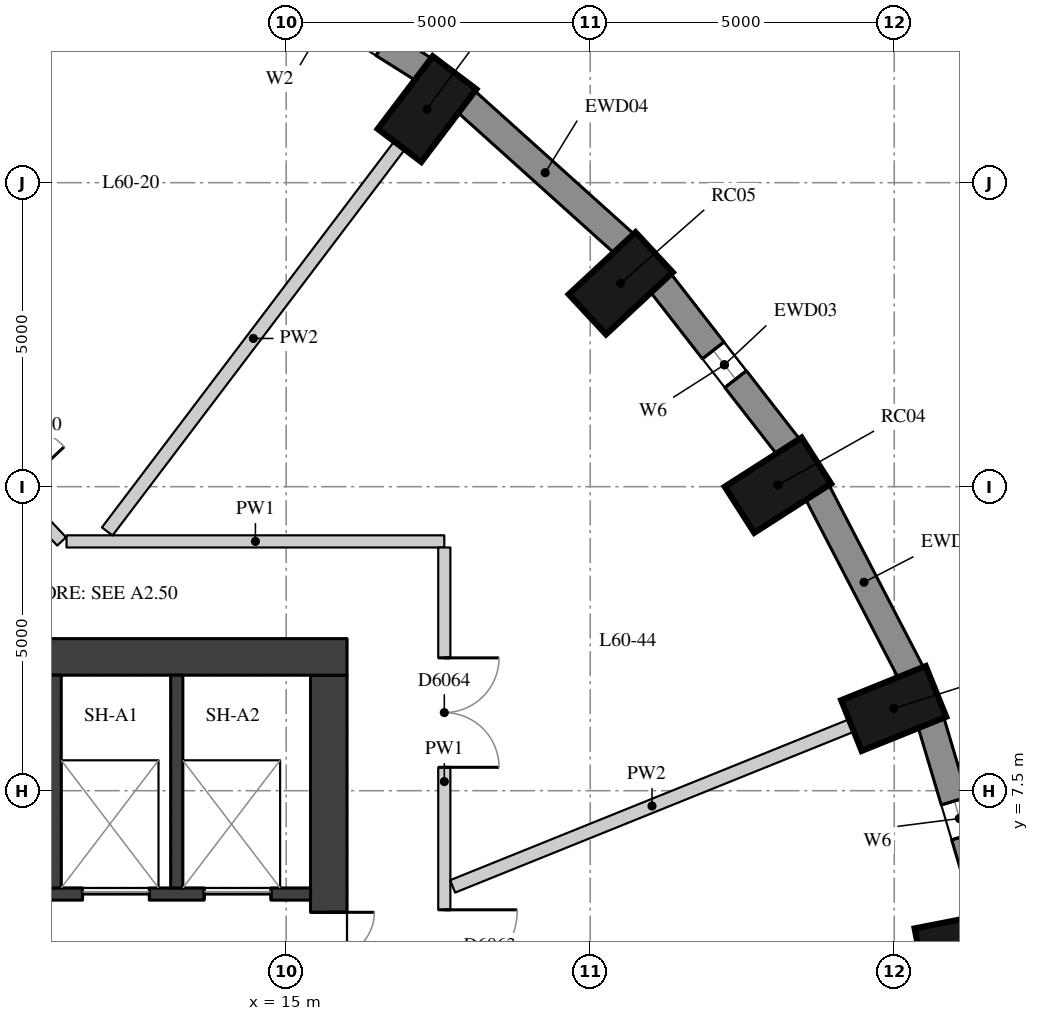
"""IFC4 building model, lengths in metres.
Left out: names, types, materials, properties, quantities, classifications, styles, units other than length and angle.
Written with IfcOpenShell. Run it as: python <this file> out.ifc"""

import sys

from ifc_helpers import new_model, si_unit, direction, frame, frame_2d, origin, origin_2d, place, context, subcontext, project, spatial, rectangle, extrude, element, fill, save


model = new_model("IFC4")
c1 = context("Model", 3, precision=1e-05, world=origin(), true_north=direction((0.0, 1.0)))
c2 = subcontext(c1, "Body", "Model", "MODEL_VIEW")
j1 = project(units=[si_unit("LENGTHUNIT", "METRE"), si_unit("PLANEANGLEUNIT", "RADIAN")], contexts=[c1])
p1 = place(None, origin())
s1 = spatial("IfcSite", under=j1, at=p1, CompositionType="ELEMENT")
p2 = place(p1, origin())
s2 = spatial("IfcBuilding", under=s1, at=p2, CompositionType="ELEMENT")
p3 = place(p2, frame((0.0, 0.0, 212.3)))
s3 = spatial("IfcBuildingStorey", under=s2, at=p3, CompositionType="ELEMENT", Elevation=212.3)
for number, where, z_axis, x_axis in (
    (1, (26.157, 4.937, 0.0), (0.0, 0.0, 1.0), (0.981, 0.192, 0.0)),
    (2, (24.991, 8.852, 0.0), (0.0, 0.0, 1.0), (0.927, 0.374, 0.0)),
    (3, (23.087, 12.525, 0.0), (0.0, 0.0, 1.0), (0.842, 0.539, 0.0)),
    (4, (20.502, 15.845, 0.0), (0.0, 0.0, 1.0), (0.732, 0.681, 0.0)),
    (5, (17.316, 18.71, 0.0), (0.0, 0.0, 1.0), (0.604, 0.797, 0.0)),
):
    element("IfcColumn", number, at=place(p3, frame(where, z_axis=z_axis, x_axis=x_axis)), inside=s3, PredefinedType="COLUMN", context=c2, shape_type="SweptSolid", body=[
        extrude(rectangle(XDim=1.5, YDim=0.9, at=origin_2d()), origin(), (0.0, 0.0, 1.0), 3.3),
    ])
p4 = place(p3, frame((26.548, 5.452, 0.0), z_axis=(0.0, 0.0, 1.0), x_axis=(-0.285444972963, 0.958395099847, 0.0)))
e6 = element("IfcWall", 6, at=p4, inside=s3, PredefinedType="SOLIDWALL", context=c2, shape_type="SweptSolid", body=[
    extrude(rectangle(XDim=3.32, YDim=0.45, at=frame_2d((1.66, 0.0))), origin(), (0.0, 0.0, 1.0), 3.02),
])
p5 = place(p4, frame((1.36, 0.0, 0.4)))
e7 = element("IfcOpeningElement", 7, at=p5, cuts=e6, PredefinedType="OPENING", context=c2, shape_type="SweptSolid", body=[
    extrude(rectangle(XDim=0.6, YDim=1.75, at=frame_2d((0.3, 0.875))), frame((0.0, 0.235, 0.0), z_axis=(0.0, -1.0, 0.0), x_axis=(1.0, 0.0, 0.0)), (0.0, 0.0, 1.0), 0.47),
])
p6 = place(p3, frame((25.278, 9.432, 0.0), z_axis=(0.0, 0.0, 1.0), x_axis=(-0.460175500475, 0.887827972505, 0.0)))
e8 = element("IfcWall", 8, at=p6, inside=s3, PredefinedType="SOLIDWALL", context=c2, shape_type="SweptSolid", body=[
    extrude(rectangle(XDim=3.371, YDim=0.45, at=frame_2d((1.685, 0.0))), origin(), (0.0, 0.0, 1.0), 3.02),
])
p7 = place(p3, frame((23.263, 13.148, 0.0), z_axis=(0.0, 0.0, 1.0), x_axis=(-0.614220816451, 0.789134201919, 0.0)))
e9 = element("IfcWall", 9, at=p7, inside=s3, PredefinedType="SOLIDWALL", context=c2, shape_type="SweptSolid", body=[
    extrude(rectangle(XDim=3.438, YDim=0.45, at=frame_2d((1.719, 0.0))), origin(), (0.0, 0.0, 1.0), 3.02),
])
p8 = place(p7, frame((1.419, 0.0, 0.4)))
e10 = element("IfcOpeningElement", 10, at=p8, cuts=e9, PredefinedType="OPENING", context=c2, shape_type="SweptSolid", body=[
    extrude(rectangle(XDim=0.6, YDim=1.75, at=frame_2d((0.3, 0.875))), frame((0.0, 0.235, 0.0), z_axis=(0.0, -1.0, 0.0), x_axis=(1.0, 0.0, 0.0)), (0.0, 0.0, 1.0), 0.47),
])
p9 = place(p3, frame((20.565, 16.49, 0.0), z_axis=(0.0, 0.0, 1.0), x_axis=(-0.743442727602, 0.668799604348, 0.0)))
e11 = element("IfcWall", 11, at=p9, inside=s3, PredefinedType="SOLIDWALL", context=c2, shape_type="SweptSolid", body=[
    extrude(rectangle(XDim=3.513, YDim=0.45, at=frame_2d((1.756, 0.0))), origin(), (0.0, 0.0, 1.0), 3.02),
])
p10 = place(p3, frame((17.267, 19.358, 0.0), z_axis=(0.0, 0.0, 1.0), x_axis=(-0.846119146727, 0.532993798783, 0.0)))
e12 = element("IfcWall", 12, at=p10, inside=s3, PredefinedType="SOLIDWALL", context=c2, shape_type="SweptSolid", body=[
    extrude(rectangle(XDim=3.587, YDim=0.45, at=frame_2d((1.793, 0.0))), origin(), (0.0, 0.0, 1.0), 3.02),
])
p11 = place(p10, frame((0.793, 0.0, 0.4)))
e13 = element("IfcOpeningElement", 13, at=p11, cuts=e12, PredefinedType="OPENING", context=c2, shape_type="SweptSolid", body=[
    extrude(rectangle(XDim=2.0, YDim=1.75, at=frame_2d((1.0, 0.875))), frame((0.0, 0.235, 0.0), z_axis=(0.0, -1.0, 0.0), x_axis=(1.0, 0.0, 0.0)), (0.0, 0.0, 1.0), 0.47),
])
p12 = place(p3, frame((15.7, -9.4, 0.0), z_axis=(0.0, 0.0, 1.0), x_axis=(0.0, 1.0, 0.0)))
e14 = element("IfcWall", 14, at=p12, inside=s3, PredefinedType="SHEAR", context=c2, shape_type="SweptSolid", body=[
    extrude(rectangle(XDim=18.8, YDim=0.6, at=frame_2d((9.4, 0.0))), origin(), (0.0, 0.0, 1.0), 3.02),
])
p13 = place(p12, frame((13.4, 0.0, 0.0)))
e15 = element("IfcOpeningElement", 15, at=p13, cuts=e14, PredefinedType="OPENING", context=c2, shape_type="SweptSolid", body=[
    extrude(rectangle(XDim=1.5, YDim=2.1, at=frame_2d((0.75, 1.05))), frame((0.0, 0.31, 0.0), z_axis=(0.0, -1.0, 0.0), x_axis=(1.0, 0.0, 0.0)), (0.0, 0.0, 1.0), 0.62),
])
p14 = place(p12, frame((3.9, 0.0, 0.0)))
e16 = element("IfcOpeningElement", 16, at=p14, cuts=e14, PredefinedType="OPENING", context=c2, shape_type="SweptSolid", body=[
    extrude(rectangle(XDim=1.5, YDim=2.1, at=frame_2d((0.75, 1.05))), frame((0.0, 0.31, 0.0), z_axis=(0.0, -1.0, 0.0), x_axis=(1.0, 0.0, 0.0)), (0.0, 0.0, 1.0), 0.62),
])
p15 = place(p3, frame((4.0, 9.7, 0.0), z_axis=(0.0, 0.0, 1.0), x_axis=(1.0, 0.0, 0.0)))
e17 = element("IfcWall", 17, at=p15, inside=s3, PredefinedType="SHEAR", context=c2, shape_type="SweptSolid", body=[
    extrude(rectangle(XDim=12.0, YDim=0.6, at=frame_2d((6.0, 0.0))), origin(), (0.0, 0.0, 1.0), 3.02),
])
p16 = place(p3, frame((4.6, 5.8, 0.0), z_axis=(0.0, 0.0, 1.0), x_axis=(1.0, 0.0, 0.0)))
e18 = element("IfcWall", 18, at=p16, inside=s3, PredefinedType="SHEAR", context=c2, shape_type="SweptSolid", body=[
    extrude(rectangle(XDim=10.8, YDim=0.2, at=frame_2d((5.4, 0.0))), origin(), (0.0, 0.0, 1.0), 3.02),
])
p17 = place(p16, frame((7.05, 0.0, 0.0)))
e19 = element("IfcOpeningElement", 19, at=p17, cuts=e18, PredefinedType="OPENING", context=c2, shape_type="SweptSolid", body=[
    extrude(rectangle(XDim=1.1, YDim=2.1, at=frame_2d((0.55, 1.05))), frame((0.0, 0.11, 0.0), z_axis=(0.0, -1.0, 0.0), x_axis=(1.0, 0.0, 0.0)), (0.0, 0.0, 1.0), 0.22),
])
p18 = place(p16, frame((9.05, 0.0, 0.0)))
e20 = element("IfcOpeningElement", 20, at=p18, cuts=e18, PredefinedType="OPENING", context=c2, shape_type="SweptSolid", body=[
    extrude(rectangle(XDim=1.1, YDim=2.1, at=frame_2d((0.55, 1.05))), frame((0.0, 0.11, 0.0), z_axis=(0.0, -1.0, 0.0), x_axis=(1.0, 0.0, 0.0)), (0.0, 0.0, 1.0), 0.22),
])
for number, where, z_axis, x_axis in (
    (21, (11.2, 5.9, 0.0), (0.0, 0.0, 1.0), (0.0, 1.0, 0.0)),
    (22, (13.2, 5.9, 0.0), (0.0, 0.0, 1.0), (0.0, 1.0, 0.0)),
):
    element("IfcWall", number, at=place(p3, frame(where, z_axis=z_axis, x_axis=x_axis)), inside=s3, PredefinedType="SHEAR", context=c2, shape_type="SweptSolid", body=[
        extrude(rectangle(XDim=3.5, YDim=0.2, at=frame_2d((1.75, 0.0))), origin(), (0.0, 0.0, 1.0), 3.02),
    ])
p19 = place(p3, frame((9.698, 13.304, 0.0), z_axis=(0.0, 0.0, 1.0), x_axis=(0.686553169295, -0.727079600684, 0.0)))
e23 = element("IfcWall", 23, at=p19, inside=s3, PredefinedType="PARTITIONING", context=c2, shape_type="SweptSolid", body=[
    extrude(rectangle(XDim=2.344, YDim=0.2, at=frame_2d((1.172, 0.0))), origin(), (0.0, 0.0, 1.0), 3.02),
])
p20 = place(p19, frame((0.14, 0.0, 0.0)))
e24 = element("IfcOpeningElement", 24, at=p20, cuts=e23, PredefinedType="OPENING", context=c2, shape_type="SweptSolid", body=[
    extrude(rectangle(XDim=1.1, YDim=2.1, at=frame_2d((0.55, 1.05))), frame((0.0, 0.11, 0.0), z_axis=(0.0, -1.0, 0.0), x_axis=(1.0, 0.0, 0.0)), (0.0, 0.0, 1.0), 0.22),
])
p21 = place(p3, frame((11.387, 11.6, 0.0), z_axis=(0.0, 0.0, 1.0), x_axis=(1.0, 0.0, 0.0)))
e25 = element("IfcWall", 25, at=p21, inside=s3, PredefinedType="PARTITIONING", context=c2, shape_type="SweptSolid", body=[
    extrude(rectangle(XDim=6.213, YDim=0.2, at=frame_2d((3.106, 0.0))), origin(), (0.0, 0.0, 1.0), 3.02),
])
p22 = place(p3, frame((17.6, 11.5, 0.0), z_axis=(0.0, 0.0, 1.0), x_axis=(0.0, -1.0, 0.0)))
e26 = element("IfcWall", 26, at=p22, inside=s3, PredefinedType="PARTITIONING", context=c2, shape_type="SweptSolid", body=[
    extrude(rectangle(XDim=7.7, YDim=0.2, at=frame_2d((3.85, 0.0))), origin(), (0.0, 0.0, 1.0), 3.02),
])
p23 = place(p22, frame((5.959, 0.0, 0.0)))
e27 = element("IfcOpeningElement", 27, at=p23, cuts=e26, PredefinedType="OPENING", context=c2, shape_type="SweptSolid", body=[
    extrude(rectangle(XDim=1.2, YDim=2.1, at=frame_2d((0.6, 1.05))), frame((0.0, 0.11, 0.0), z_axis=(0.0, -1.0, 0.0), x_axis=(1.0, 0.0, 0.0)), (0.0, 0.0, 1.0), 0.22),
])
p24 = place(p22, frame((1.815, 0.0, 0.0)))
e28 = element("IfcOpeningElement", 28, at=p24, cuts=e26, PredefinedType="OPENING", context=c2, shape_type="SweptSolid", body=[
    extrude(rectangle(XDim=1.8, YDim=2.1, at=frame_2d((0.9, 1.05))), frame((0.0, 0.11, 0.0), z_axis=(0.0, -1.0, 0.0), x_axis=(1.0, 0.0, 0.0)), (0.0, 0.0, 1.0), 0.22),
])
p25 = place(p3, frame((24.295, 8.571, 0.0), z_axis=(0.0, 0.0, 1.0), x_axis=(-0.927386999215, -0.374103399728, 0.0)))
e29 = element("IfcWall", 29, at=p25, inside=s3, PredefinedType="PARTITIONING", context=c2, shape_type="SweptSolid", body=[
    extrude(rectangle(XDim=7.072, YDim=0.22, at=frame_2d((3.536, 0.0))), origin(), (0.0, 0.0, 1.0), 3.02),
])
p26 = place(p3, frame((16.863, 18.113, 0.0), z_axis=(0.0, 0.0, 1.0), x_axis=(-0.603628639054, -0.797265618294, 0.0)))
e30 = element("IfcWall", 30, at=p26, inside=s3, PredefinedType="PARTITIONING", context=c2, shape_type="SweptSolid", body=[
    extrude(rectangle(XDim=7.963, YDim=0.22, at=frame_2d((3.982, 0.0))), origin(), (0.0, 0.0, 1.0), 3.02),
])
p27 = place(p5, origin())
e31 = element("IfcWindow", 31, at=p27, inside=s3, PartitioningType="SINGLE_PANEL", PredefinedType="WINDOW", context=c2, shape_type="SweptSolid", body=[
    extrude(rectangle(XDim=0.6, YDim=1.75, at=frame_2d((0.3, 0.875))), frame((0.0, 0.035, 0.0), z_axis=(0.0, -1.0, 0.0), x_axis=(1.0, 0.0, 0.0)), (0.0, 0.0, 1.0), 0.06),
])
fill(e7, e31)
p28 = place(p8, origin())
e32 = element("IfcWindow", 32, at=p28, inside=s3, PartitioningType="SINGLE_PANEL", PredefinedType="WINDOW", context=c2, shape_type="SweptSolid", body=[
    extrude(rectangle(XDim=0.6, YDim=1.75, at=frame_2d((0.3, 0.875))), frame((0.0, 0.035, 0.0), z_axis=(0.0, -1.0, 0.0), x_axis=(1.0, 0.0, 0.0)), (0.0, 0.0, 1.0), 0.06),
])
fill(e10, e32)
p29 = place(p13, origin())
e33 = element("IfcDoor", 33, at=p29, inside=s3, OperationType="DOUBLE_DOOR_SINGLE_SWING", PredefinedType="DOOR", context=c2, shape_type="SweptSolid", body=[
    extrude(rectangle(XDim=1.5, YDim=2.1, at=frame_2d((0.75, 1.05))), frame((0.0, 0.025, 0.0), z_axis=(0.0, -1.0, 0.0), x_axis=(1.0, 0.0, 0.0)), (0.0, 0.0, 1.0), 0.05),
])
fill(e15, e33)
p30 = place(p17, origin())
e34 = element("IfcDoor", 34, at=p30, inside=s3, OperationType="DOUBLE_DOOR_SLIDING", PredefinedType="DOOR", context=c2, shape_type="SweptSolid", body=[
    extrude(rectangle(XDim=1.1, YDim=2.1, at=frame_2d((0.55, 1.05))), frame((0.0, 0.025, 0.0), z_axis=(0.0, -1.0, 0.0), x_axis=(1.0, 0.0, 0.0)), (0.0, 0.0, 1.0), 0.05),
])
fill(e19, e34)
p31 = place(p18, origin())
e35 = element("IfcDoor", 35, at=p31, inside=s3, OperationType="DOUBLE_DOOR_SLIDING", PredefinedType="DOOR", context=c2, shape_type="SweptSolid", body=[
    extrude(rectangle(XDim=1.1, YDim=2.1, at=frame_2d((0.55, 1.05))), frame((0.0, 0.025, 0.0), z_axis=(0.0, -1.0, 0.0), x_axis=(1.0, 0.0, 0.0)), (0.0, 0.0, 1.0), 0.05),
])
fill(e20, e35)
p32 = place(p23, origin())
e36 = element("IfcDoor", 36, at=p32, inside=s3, OperationType="SINGLE_SWING_LEFT", PredefinedType="DOOR", context=c2, shape_type="SweptSolid", body=[
    extrude(rectangle(XDim=1.2, YDim=2.1, at=frame_2d((0.6, 1.05))), frame((0.0, 0.025, 0.0), z_axis=(0.0, -1.0, 0.0), x_axis=(1.0, 0.0, 0.0)), (0.0, 0.0, 1.0), 0.05),
])
fill(e27, e36)
p33 = place(p24, origin())
e37 = element("IfcDoor", 37, at=p33, inside=s3, OperationType="DOUBLE_DOOR_SINGLE_SWING", PredefinedType="DOOR", context=c2, shape_type="SweptSolid", body=[
    extrude(rectangle(XDim=1.8, YDim=2.1, at=frame_2d((0.9, 1.05))), frame((0.0, 0.025, 0.0), z_axis=(0.0, -1.0, 0.0), x_axis=(1.0, 0.0, 0.0)), (0.0, 0.0, 1.0), 0.05),
])
fill(e28, e37)
save(model, sys.argv[1])
